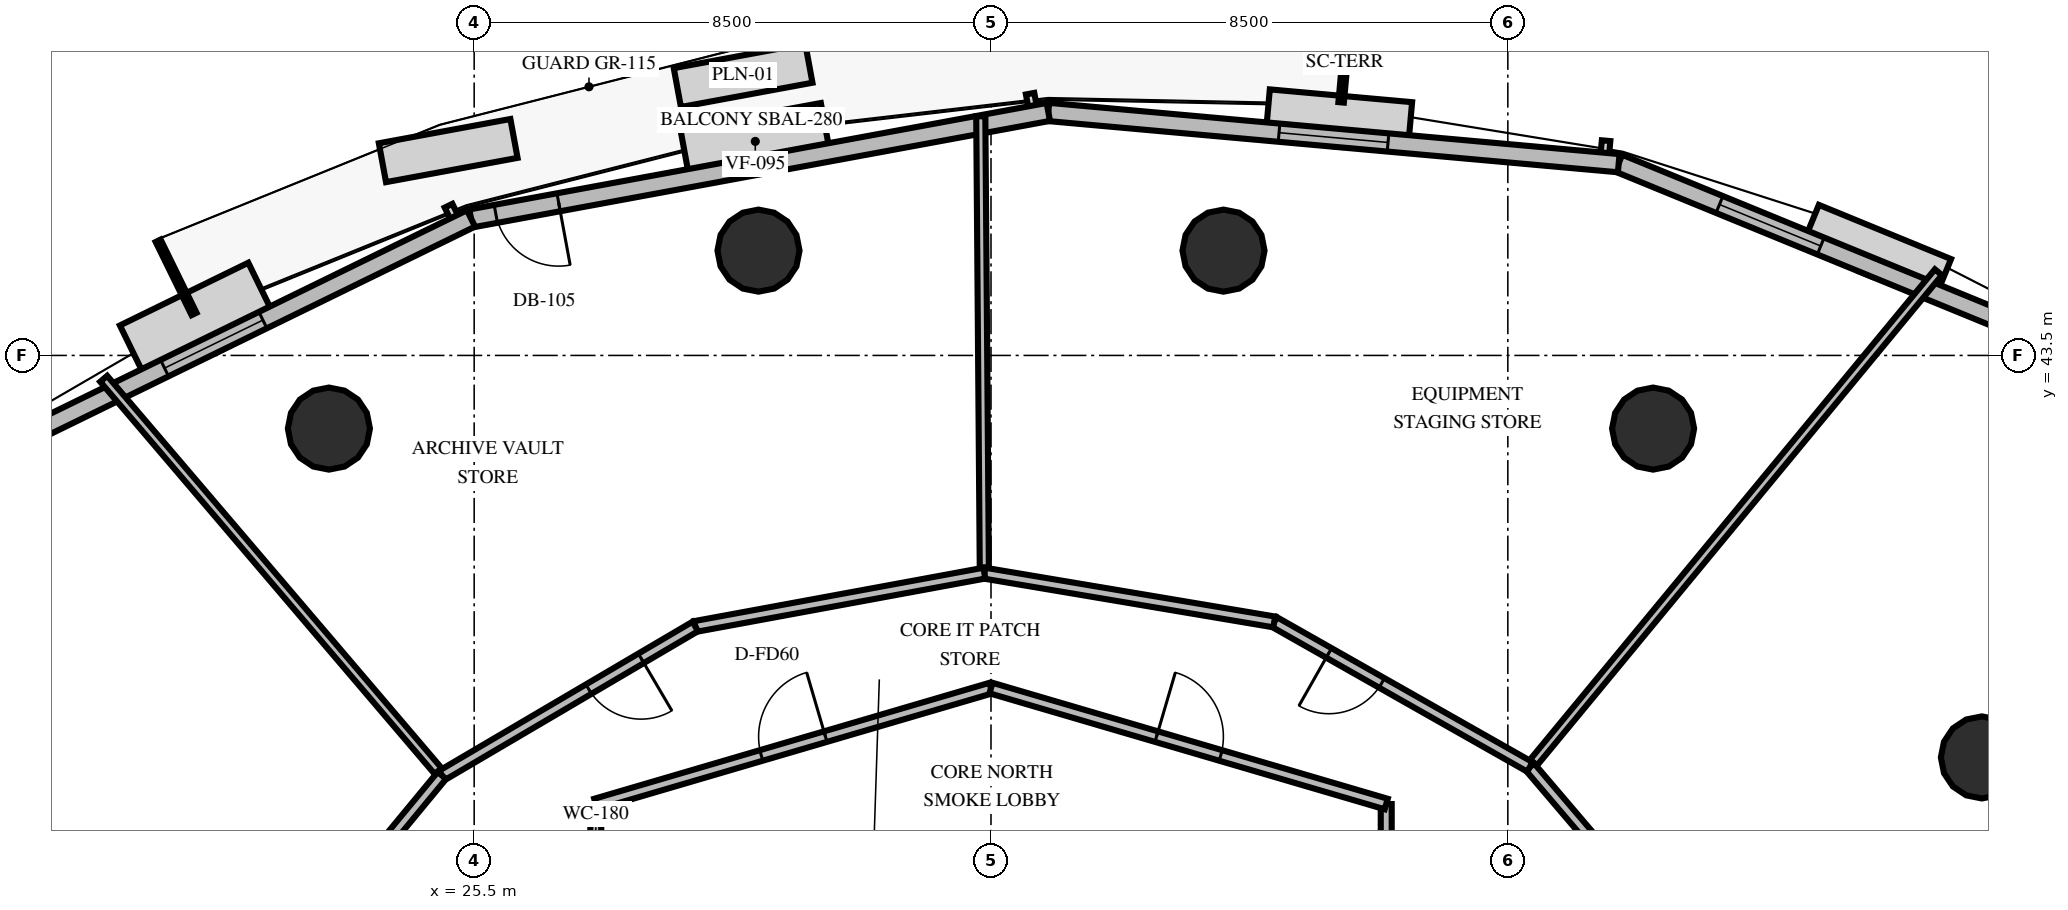
"""IFC4 building model, lengths in metres.
Left out: names, types, materials, properties, quantities, classifications, styles, units other than length and angle.
Written with IfcOpenShell. Run it as: python <this file> out.ifc"""

import sys

from ifc_helpers import new_model, si_unit, direction, frame, frame_2d, origin, origin_2d, place, context, subcontext, project, spatial, rectangle, circle, extrude, element, fill, save


model = new_model("IFC4")
c1 = context("Model", 3, precision=1e-05, world=origin(), true_north=direction((0.0, 1.0)))
c2 = subcontext(c1, "Body", "Model", "MODEL_VIEW")
j1 = project(units=[si_unit("LENGTHUNIT", "METRE"), si_unit("PLANEANGLEUNIT", "RADIAN")], contexts=[c1])
p1 = place(None, origin())
s1 = spatial("IfcSite", under=j1, at=p1, CompositionType="ELEMENT")
p2 = place(p1, origin())
s2 = spatial("IfcBuilding", under=s1, at=p2, CompositionType="ELEMENT")
p3 = place(p2, frame((0.0, 0.0, 76.2)))
s3 = spatial("IfcBuildingStorey", under=s2, at=p3, CompositionType="ELEMENT", Elevation=76.2)
for number, where, z_axis, x_axis in (
    (1, (50.297, 36.889, 0.0), (0.0, 0.0, 1.0), (1.0, 0.0, 0.0)),
    (2, (44.889, 42.297, 0.0), (0.0, 0.0, 1.0), (1.0, 0.0, 0.0)),
    (3, (37.824, 45.223, 0.0), (0.0, 0.0, 1.0), (1.0, 0.0, 0.0)),
    (4, (30.176, 45.223, 0.0), (0.0, 0.0, 1.0), (1.0, 0.0, 0.0)),
    (5, (23.111, 42.297, 0.0), (0.0, 0.0, 1.0), (1.0, 0.0, 0.0)),
):
    element("IfcColumn", number, at=place(p3, frame(where, z_axis=z_axis, x_axis=x_axis)), inside=s3, PredefinedType="COLUMN", context=c2, shape_type="SweptSolid", body=[
        extrude(circle(Radius=0.675, at=origin_2d()), origin(), (0.0, 0.0, 1.0), 4.2),
    ])
p4 = place(p3, frame((52.459, 43.327, 0.0), z_axis=(0.0, 0.0, 1.0), x_axis=(-0.925289325161, 0.379262000131, 0.0)))
e6 = element("IfcWall", 6, at=p4, inside=s3, PredefinedType="SOLIDWALL", context=c2, shape_type="SweptSolid", body=[
    extrude(rectangle(XDim=8.793, YDim=0.3, at=frame_2d((4.396, 0.0))), origin(), (0.0, 0.0, 1.0), 3.0),
])
p5 = place(p4, frame((5.202, 0.0, 0.8)))
e7 = element("IfcOpeningElement", 7, at=p5, cuts=e6, PredefinedType="OPENING", context=c2, shape_type="SweptSolid", body=[
    extrude(rectangle(XDim=1.8, YDim=1.95, at=frame_2d((0.9, 0.975))), frame((0.0, 0.16, 0.0), z_axis=(0.0, -1.0, 0.0), x_axis=(1.0, 0.0, 0.0)), (0.0, 0.0, 1.0), 0.32),
])
p6 = place(p3, frame((44.324, 46.662, 0.0), z_axis=(0.0, 0.0, 1.0), x_axis=(-0.995991198561, 0.089451285003, 0.0)))
e8 = element("IfcWall", 8, at=p6, inside=s3, PredefinedType="SOLIDWALL", context=c2, shape_type="SweptSolid", body=[
    extrude(rectangle(XDim=9.419, YDim=0.3, at=frame_2d((4.709, 0.0))), origin(), (0.0, 0.0, 1.0), 3.0),
])
p7 = place(p6, frame((3.809, 0.0, 0.8)))
e9 = element("IfcOpeningElement", 9, at=p7, cuts=e8, PredefinedType="OPENING", context=c2, shape_type="SweptSolid", body=[
    extrude(rectangle(XDim=1.8, YDim=1.95, at=frame_2d((0.9, 0.975))), frame((0.0, 0.16, 0.0), z_axis=(0.0, -1.0, 0.0), x_axis=(1.0, 0.0, 0.0)), (0.0, 0.0, 1.0), 0.32),
])
p8 = place(p3, frame((34.943, 47.504, 0.0), z_axis=(0.0, 0.0, 1.0), x_axis=(-0.983412379237, -0.18138382608, 0.0)))
e10 = element("IfcWall", 10, at=p8, inside=s3, PredefinedType="SOLIDWALL", context=c2, shape_type="SweptSolid", body=[
    extrude(rectangle(XDim=9.655, YDim=0.3, at=frame_2d((4.827, 0.0))), origin(), (0.0, 0.0, 1.0), 3.0),
])
p9 = place(p8, frame((8.19, 0.0, 0.0)))
e11 = element("IfcOpeningElement", 11, at=p9, cuts=e10, PredefinedType="OPENING", context=c2, shape_type="SweptSolid", body=[
    extrude(rectangle(XDim=1.05, YDim=2.15, at=frame_2d((0.525, 1.075))), frame((0.0, 0.16, 0.0), z_axis=(0.0, -1.0, 0.0), x_axis=(1.0, 0.0, 0.0)), (0.0, 0.0, 1.0), 0.32),
])
p10 = place(p3, frame((25.448, 45.753, 0.0), z_axis=(0.0, 0.0, 1.0), x_axis=(-0.898541129578, -0.438889323699, 0.0)))
e12 = element("IfcWall", 12, at=p10, inside=s3, PredefinedType="SOLIDWALL", context=c2, shape_type="SweptSolid", body=[
    extrude(rectangle(XDim=9.419, YDim=0.3, at=frame_2d((4.709, 0.0))), origin(), (0.0, 0.0, 1.0), 3.0),
])
p11 = place(p10, frame((3.809, 0.0, 0.8)))
e13 = element("IfcOpeningElement", 13, at=p11, cuts=e12, PredefinedType="OPENING", context=c2, shape_type="SweptSolid", body=[
    extrude(rectangle(XDim=1.8, YDim=1.95, at=frame_2d((0.9, 0.975))), frame((0.0, 0.16, 0.0), z_axis=(0.0, -1.0, 0.0), x_axis=(1.0, 0.0, 0.0)), (0.0, 0.0, 1.0), 0.32),
])
for number, where, z_axis, x_axis in (
    (14, (27.5, 34.43, 0.0), (0.0, 0.0, 1.0), (0.0, 1.0, 0.0)),
    (15, (40.5, 36.123, 0.0), (0.0, 0.0, 1.0), (0.0, -1.0, 0.0)),
):
    element("IfcWall", number, at=place(p3, frame(where, z_axis=z_axis, x_axis=x_axis)), inside=s3, PredefinedType="PARTITIONING", context=c2, shape_type="SweptSolid", body=[
        extrude(rectangle(XDim=1.693, YDim=0.18, at=frame_2d((0.846, 0.0))), origin(), (0.0, 0.0, 1.0), 3.0),
    ])
p12 = place(p3, frame((27.5, 36.123, 0.0), z_axis=(0.0, 0.0, 1.0), x_axis=(0.959546654541, 0.281549671923, 0.0)))
e16 = element("IfcWall", 16, at=p12, inside=s3, PredefinedType="PARTITIONING", context=c2, shape_type="SweptSolid", body=[
    extrude(rectangle(XDim=6.774, YDim=0.18, at=frame_2d((3.387, 0.0))), origin(), (0.0, 0.0, 1.0), 3.0),
])
p13 = place(p12, frame((2.837, 0.0, 0.0)))
e17 = element("IfcOpeningElement", 17, at=p13, cuts=e16, PredefinedType="OPENING", context=c2, shape_type="SweptSolid", body=[
    extrude(rectangle(XDim=1.1, YDim=2.15, at=frame_2d((0.55, 1.075))), frame((0.0, 0.1, 0.0), z_axis=(0.0, -1.0, 0.0), x_axis=(1.0, 0.0, 0.0)), (0.0, 0.0, 1.0), 0.2),
])
p14 = place(p3, frame((34.0, 38.03, 0.0), z_axis=(0.0, 0.0, 1.0), x_axis=(0.959546654541, -0.281549671923, 0.0)))
e18 = element("IfcWall", 18, at=p14, inside=s3, PredefinedType="PARTITIONING", context=c2, shape_type="SweptSolid", body=[
    extrude(rectangle(XDim=6.774, YDim=0.18, at=frame_2d((3.387, 0.0))), origin(), (0.0, 0.0, 1.0), 3.0),
])
p15 = place(p14, frame((2.837, 0.0, 0.0)))
e19 = element("IfcOpeningElement", 19, at=p15, cuts=e18, PredefinedType="OPENING", context=c2, shape_type="SweptSolid", body=[
    extrude(rectangle(XDim=1.1, YDim=2.15, at=frame_2d((0.55, 1.075))), frame((0.0, 0.1, 0.0), z_axis=(0.0, -1.0, 0.0), x_axis=(1.0, 0.0, 0.0)), (0.0, 0.0, 1.0), 0.2),
])
p16 = place(p3, frame((42.864, 36.733, 0.0), z_axis=(0.0, 0.0, 1.0), x_axis=(0.636757052036, 0.771064495799, 0.0)))
e20 = element("IfcWall", 20, at=p16, inside=s3, PredefinedType="PARTITIONING", context=c2, shape_type="SweptSolid", body=[
    extrude(rectangle(XDim=10.55, YDim=0.15, at=frame_2d((5.275, 0.0))), origin(), (0.0, 0.0, 1.0), 3.0),
])
p17 = place(p3, frame((46.0, 33.054, 0.0), z_axis=(0.0, 0.0, 1.0), x_axis=(-0.648772052091, 0.760982801662, 0.0)))
e21 = element("IfcWall", 21, at=p17, inside=s3, PredefinedType="PARTITIONING", context=c2, shape_type="SweptSolid", body=[
    extrude(rectangle(XDim=4.834, YDim=0.18, at=frame_2d((2.417, 0.0))), origin(), (0.0, 0.0, 1.0), 3.0),
])
p18 = place(p3, frame((33.891, 39.92, 0.0), z_axis=(0.0, 0.0, 1.0), x_axis=(-0.007830791573, 0.999969338882, 0.0)))
e22 = element("IfcWall", 22, at=p18, inside=s3, PredefinedType="PARTITIONING", context=c2, shape_type="SweptSolid", body=[
    extrude(rectangle(XDim=7.514, YDim=0.15, at=frame_2d((3.757, 0.0))), origin(), (0.0, 0.0, 1.0), 3.0),
])
p19 = place(p3, frame((42.864, 36.733, 0.0), z_axis=(0.0, 0.0, 1.0), x_axis=(-0.869944192354, 0.493150182186, 0.0)))
e23 = element("IfcWall", 23, at=p19, inside=s3, PredefinedType="PARTITIONING", context=c2, shape_type="SweptSolid", body=[
    extrude(rectangle(XDim=4.834, YDim=0.18, at=frame_2d((2.417, 0.0))), origin(), (0.0, 0.0, 1.0), 3.0),
])
p20 = place(p19, frame((2.801, 0.0, 0.0)))
e24 = element("IfcOpeningElement", 24, at=p20, cuts=e23, PredefinedType="OPENING", context=c2, shape_type="SweptSolid", body=[
    extrude(rectangle(XDim=1.0, YDim=2.15, at=frame_2d((0.5, 1.075))), frame((0.0, 0.1, 0.0), z_axis=(0.0, -1.0, 0.0), x_axis=(1.0, 0.0, 0.0)), (0.0, 0.0, 1.0), 0.2),
])
p21 = place(p3, frame((38.658, 39.117, 0.0), z_axis=(0.0, 0.0, 1.0), x_axis=(-0.986134744465, 0.165946575015, 0.0)))
e25 = element("IfcWall", 25, at=p21, inside=s3, PredefinedType="PARTITIONING", context=c2, shape_type="SweptSolid", body=[
    extrude(rectangle(XDim=4.834, YDim=0.18, at=frame_2d((2.417, 0.0))), origin(), (0.0, 0.0, 1.0), 3.0),
])
p22 = place(p3, frame((24.969, 36.593, 0.0), z_axis=(0.0, 0.0, 1.0), x_axis=(-0.648805013495, 0.76095469935, 0.0)))
e26 = element("IfcWall", 26, at=p22, inside=s3, PredefinedType="PARTITIONING", context=c2, shape_type="SweptSolid", body=[
    extrude(rectangle(XDim=8.573, YDim=0.15, at=frame_2d((4.286, 0.0))), origin(), (0.0, 0.0, 1.0), 3.0),
])
p23 = place(p3, frame((33.891, 39.92, 0.0), z_axis=(0.0, 0.0, 1.0), x_axis=(-0.983409356077, -0.181400216044, 0.0)))
e27 = element("IfcWall", 27, at=p23, inside=s3, PredefinedType="PARTITIONING", context=c2, shape_type="SweptSolid", body=[
    extrude(rectangle(XDim=4.834, YDim=0.18, at=frame_2d((2.417, 0.0))), origin(), (0.0, 0.0, 1.0), 3.0),
])
p24 = place(p3, frame((29.136, 39.043, 0.0), z_axis=(0.0, 0.0, 1.0), x_axis=(-0.862070500673, -0.506788369904, 0.0)))
e28 = element("IfcWall", 28, at=p24, inside=s3, PredefinedType="PARTITIONING", context=c2, shape_type="SweptSolid", body=[
    extrude(rectangle(XDim=4.834, YDim=0.18, at=frame_2d((2.417, 0.0))), origin(), (0.0, 0.0, 1.0), 3.0),
])
p25 = place(p24, frame((1.034, 0.0, 0.0)))
e29 = element("IfcOpeningElement", 29, at=p25, cuts=e28, PredefinedType="OPENING", context=c2, shape_type="SweptSolid", body=[
    extrude(rectangle(XDim=1.0, YDim=2.15, at=frame_2d((0.5, 1.075))), frame((0.0, 0.1, 0.0), z_axis=(0.0, -1.0, 0.0), x_axis=(1.0, 0.0, 0.0)), (0.0, 0.0, 1.0), 0.2),
])
p26 = place(p3, frame((24.969, 36.593, 0.0), z_axis=(0.0, 0.0, 1.0), x_axis=(-0.636745713157, -0.771073859481, 0.0)))
e30 = element("IfcWall", 30, at=p26, inside=s3, PredefinedType="PARTITIONING", context=c2, shape_type="SweptSolid", body=[
    extrude(rectangle(XDim=4.834, YDim=0.18, at=frame_2d((2.417, 0.0))), origin(), (0.0, 0.0, 1.0), 3.0),
])
p27 = place(p5, origin())
e31 = element("IfcWindow", 31, at=p27, inside=s3, PartitioningType="SINGLE_PANEL", PredefinedType="WINDOW", context=c2, shape_type="SweptSolid", body=[
    extrude(rectangle(XDim=1.8, YDim=1.95, at=frame_2d((0.9, 0.975))), frame((0.0, 0.03, 0.0), z_axis=(0.0, -1.0, 0.0), x_axis=(1.0, 0.0, 0.0)), (0.0, 0.0, 1.0), 0.06),
])
fill(e7, e31)
p28 = place(p7, origin())
e32 = element("IfcWindow", 32, at=p28, inside=s3, PartitioningType="SINGLE_PANEL", PredefinedType="WINDOW", context=c2, shape_type="SweptSolid", body=[
    extrude(rectangle(XDim=1.8, YDim=1.95, at=frame_2d((0.9, 0.975))), frame((0.0, 0.03, 0.0), z_axis=(0.0, -1.0, 0.0), x_axis=(1.0, 0.0, 0.0)), (0.0, 0.0, 1.0), 0.06),
])
fill(e9, e32)
p29 = place(p9, origin())
e33 = element("IfcDoor", 33, at=p29, inside=s3, OperationType="SINGLE_SWING_LEFT", PredefinedType="DOOR", context=c2, shape_type="SweptSolid", body=[
    extrude(rectangle(XDim=1.05, YDim=2.15, at=frame_2d((0.525, 1.075))), frame((0.0, 0.025, 0.0), z_axis=(0.0, -1.0, 0.0), x_axis=(1.0, 0.0, 0.0)), (0.0, 0.0, 1.0), 0.05),
])
fill(e11, e33)
p30 = place(p11, origin())
e34 = element("IfcWindow", 34, at=p30, inside=s3, PartitioningType="SINGLE_PANEL", PredefinedType="WINDOW", context=c2, shape_type="SweptSolid", body=[
    extrude(rectangle(XDim=1.8, YDim=1.95, at=frame_2d((0.9, 0.975))), frame((0.0, 0.03, 0.0), z_axis=(0.0, -1.0, 0.0), x_axis=(1.0, 0.0, 0.0)), (0.0, 0.0, 1.0), 0.06),
])
fill(e13, e34)
p31 = place(p13, origin())
e35 = element("IfcDoor", 35, at=p31, inside=s3, OperationType="SINGLE_SWING_RIGHT", PredefinedType="DOOR", context=c2, shape_type="SweptSolid", body=[
    extrude(rectangle(XDim=1.1, YDim=2.15, at=frame_2d((0.55, 1.075))), frame((0.0, 0.025, 0.0), z_axis=(0.0, -1.0, 0.0), x_axis=(1.0, 0.0, 0.0)), (0.0, 0.0, 1.0), 0.05),
])
fill(e17, e35)
p32 = place(p15, origin())
e36 = element("IfcDoor", 36, at=p32, inside=s3, OperationType="SINGLE_SWING_LEFT", PredefinedType="DOOR", context=c2, shape_type="SweptSolid", body=[
    extrude(rectangle(XDim=1.1, YDim=2.15, at=frame_2d((0.55, 1.075))), frame((0.0, 0.025, 0.0), z_axis=(0.0, -1.0, 0.0), x_axis=(1.0, 0.0, 0.0)), (0.0, 0.0, 1.0), 0.05),
])
fill(e19, e36)
p33 = place(p20, origin())
e37 = element("IfcDoor", 37, at=p33, inside=s3, OperationType="SINGLE_SWING_RIGHT", PredefinedType="DOOR", context=c2, shape_type="SweptSolid", body=[
    extrude(rectangle(XDim=1.0, YDim=2.15, at=frame_2d((0.5, 1.075))), frame((0.0, 0.025, 0.0), z_axis=(0.0, -1.0, 0.0), x_axis=(1.0, 0.0, 0.0)), (0.0, 0.0, 1.0), 0.05),
])
fill(e24, e37)
p34 = place(p25, origin())
e38 = element("IfcDoor", 38, at=p34, inside=s3, OperationType="SINGLE_SWING_LEFT", PredefinedType="DOOR", context=c2, shape_type="SweptSolid", body=[
    extrude(rectangle(XDim=1.0, YDim=2.15, at=frame_2d((0.5, 1.075))), frame((0.0, 0.025, 0.0), z_axis=(0.0, -1.0, 0.0), x_axis=(1.0, 0.0, 0.0)), (0.0, 0.0, 1.0), 0.05),
])
fill(e29, e38)
save(model, sys.argv[1])
